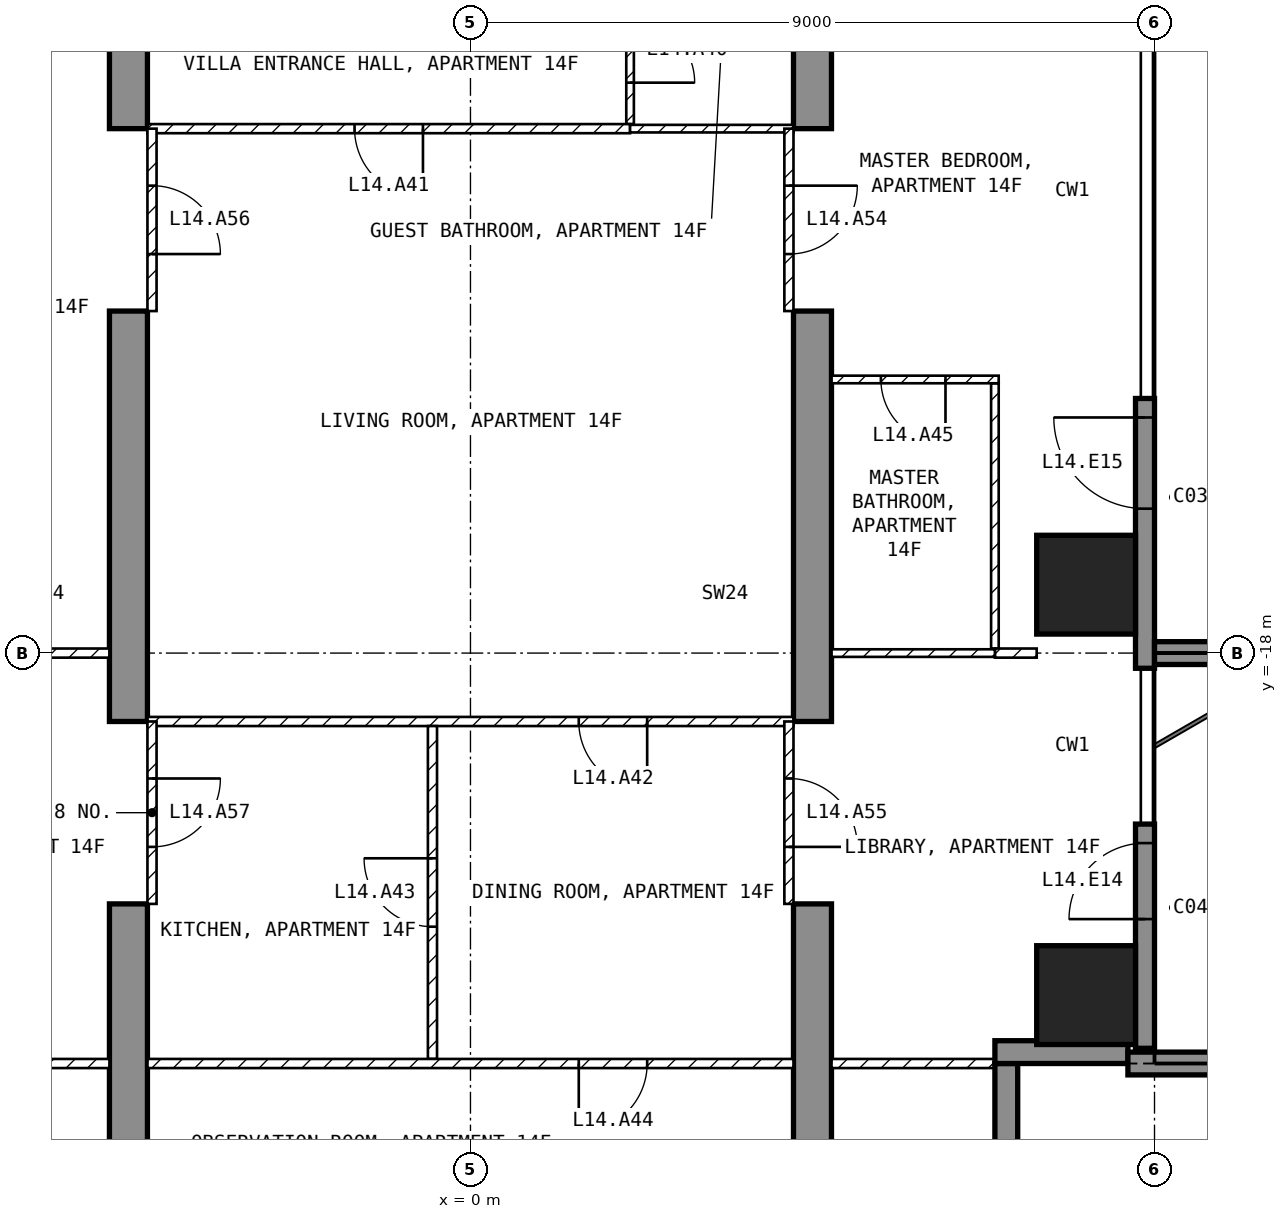
"""IFC4 building model, lengths in metres.
Left out: names, types, materials, properties, quantities, classifications, styles, units other than length and angle.
Written with IfcOpenShell. Run it as: python <this file> out.ifc"""

import sys

from ifc_helpers import new_model, si_unit, direction, frame, frame_2d, origin, origin_2d, place, context, subcontext, project, spatial, polyline, rectangle, outline, extrude, element, fill, save


model = new_model("IFC4")
c1 = context("Model", 3, precision=1e-05, world=origin(), true_north=direction((0.0, 1.0)))
c2 = subcontext(c1, "Body", "Model", "MODEL_VIEW")
j1 = project(units=[si_unit("LENGTHUNIT", "METRE"), si_unit("PLANEANGLEUNIT", "RADIAN")], contexts=[c1])
p1 = place(None, origin())
s1 = spatial("IfcSite", under=j1, at=p1, CompositionType="ELEMENT")
p2 = place(p1, origin())
s2 = spatial("IfcBuilding", under=s1, at=p2, CompositionType="ELEMENT")
p3 = place(p2, frame((0.0, 0.0, 68.0)))
s3 = spatial("IfcBuildingStorey", under=s2, at=p3, CompositionType="ELEMENT", Elevation=68.0)
for number, where, z_axis, x_axis in (
    (1, (8.1, -22.5, -0.25), (0.0, 0.0, 1.0), (1.0, 0.0, 0.0)),
    (2, (8.1, -17.1, -0.25), (0.0, 0.0, 1.0), (1.0, 0.0, 0.0)),
):
    element("IfcColumn", number, at=place(p3, frame(where, z_axis=z_axis, x_axis=x_axis)), inside=s3, PredefinedType="COLUMN", context=c2, shape_type="SweptSolid", body=[
        extrude(rectangle(XDim=1.3, YDim=1.3, at=origin_2d()), origin(), (0.0, 0.0, 1.0), 3.5),
    ])
for number, where, z_axis, x_axis in (
    (3, (-4.75, -25.45, -0.25), (1.0, 0.0, 0.0), (0.0, 1.0, 0.0)),
    (4, (4.25, -25.45, -0.25), (1.0, 0.0, 0.0), (0.0, 1.0, 0.0)),
):
    element("IfcWall", number, at=place(p3, frame(where, z_axis=z_axis, x_axis=x_axis)), inside=s3, PredefinedType="SHEAR", context=c2, shape_type="SweptSolid", body=[
        extrude(outline(polyline([(0.0, 0.0), (4.15, 0.0), (4.15, 2.65), (6.55, 2.65), (6.55, 0.0), (11.95, 0.0), (11.95, 2.65), (14.35, 2.65), (14.35, 0.0), (16.45, 0.0), (16.45, 3.5), (0.0, 3.5), (0.0, 0.0)])), origin(), (0.0, 0.0, 1.0), 0.5),
    ])
p4 = place(p3, frame((8.875, -23.2, 0.0), z_axis=(0.0, 0.0, 1.0), x_axis=(0.0, 1.0, 0.0)))
e5 = element("IfcWall", 5, at=p4, inside=s3, PredefinedType="SOLIDWALL", context=c2, shape_type="SweptSolid", body=[
    extrude(rectangle(XDim=2.95, YDim=0.25, at=frame_2d((1.475, 0.0))), origin(), (0.0, 0.0, 1.0), 3.25),
])
p5 = place(p4, frame((1.7, 0.0, 0.0)))
e6 = element("IfcOpeningElement", 6, at=p5, cuts=e5, PredefinedType="OPENING", context=c2, shape_type="SweptSolid", body=[
    extrude(rectangle(XDim=1.0, YDim=2.4, at=frame_2d((0.5, 1.2))), frame((0.0, 0.135, 0.0), z_axis=(0.0, -1.0, 0.0), x_axis=(1.0, 0.0, 0.0)), (0.0, 0.0, 1.0), 0.27),
])
p6 = place(p3, frame((8.875, -18.2, 0.0), z_axis=(0.0, 0.0, 1.0), x_axis=(0.0, 1.0, 0.0)))
e7 = element("IfcWall", 7, at=p6, inside=s3, PredefinedType="SOLIDWALL", context=c2, shape_type="SweptSolid", body=[
    extrude(rectangle(XDim=3.55, YDim=0.25, at=frame_2d((1.775, 0.0))), origin(), (0.0, 0.0, 1.0), 3.25),
])
p7 = place(p6, frame((2.1, 0.0, 0.0)))
e8 = element("IfcOpeningElement", 8, at=p7, cuts=e7, PredefinedType="OPENING", context=c2, shape_type="SweptSolid", body=[
    extrude(rectangle(XDim=1.2, YDim=2.4, at=frame_2d((0.6, 1.2))), frame((0.0, 0.135, 0.0), z_axis=(0.0, -1.0, 0.0), x_axis=(1.0, 0.0, 0.0)), (0.0, 0.0, 1.0), 0.27),
])
p8 = place(p3, frame((7.05, -25.2, 0.0), z_axis=(0.0, 0.0, 1.0), x_axis=(0.0, 1.0, 0.0)))
e9 = element("IfcWall", 9, at=p8, inside=s3, PredefinedType="SOLIDWALL", context=c2, shape_type="SweptSolid", body=[
    extrude(rectangle(XDim=1.8, YDim=0.3, at=frame_2d((0.9, 0.0))), origin(), (0.0, 0.0, 1.0), 3.25),
])
p9 = place(p3, frame((6.9, -23.25, 0.0), z_axis=(0.0, 0.0, 1.0), x_axis=(1.0, 0.0, 0.0)))
e10 = element("IfcWall", 10, at=p9, inside=s3, PredefinedType="SOLIDWALL", context=c2, shape_type="SweptSolid", body=[
    extrude(rectangle(XDim=1.75, YDim=0.3, at=frame_2d((0.875, 0.0))), origin(), (0.0, 0.0, 1.0), 3.25),
])
p10 = place(p3, frame((8.65, -23.4, 0.0), z_axis=(0.0, 0.0, 1.0), x_axis=(1.0, 0.0, 0.0)))
e11 = element("IfcWall", 11, at=p10, inside=s3, PredefinedType="SOLIDWALL", context=c2, shape_type="SweptSolid", body=[
    extrude(rectangle(XDim=3.05, YDim=0.3, at=frame_2d((1.525, 0.0))), origin(), (0.0, 0.0, 1.0), 3.25),
])
p11 = place(p3, frame((9.0, -18.0, 0.0), z_axis=(0.0, 0.0, 1.0), x_axis=(1.0, 0.0, 0.0)))
e12 = element("IfcWall", 12, at=p11, inside=s3, PredefinedType="SOLIDWALL", context=c2, shape_type="SweptSolid", body=[
    extrude(rectangle(XDim=2.7, YDim=0.3, at=frame_2d((1.35, 0.0))), origin(), (0.0, 0.0, 1.0), 3.25),
])
p12 = place(p3, frame((2.1, -9.1, 0.0), z_axis=(0.0, 0.0, 1.0), x_axis=(0.0, -1.0, 0.0)))
e13 = element("IfcWall", 13, at=p12, inside=s3, PredefinedType="PARTITIONING", context=c2, shape_type="SweptSolid", body=[
    extrude(rectangle(XDim=1.94, YDim=0.1, at=frame_2d((0.97, 0.0))), origin(), (0.0, 0.0, 1.0), 3.25),
])
p13 = place(p12, frame((0.545, 0.0, 0.0)))
e14 = element("IfcOpeningElement", 14, at=p13, cuts=e13, PredefinedType="OPENING", context=c2, shape_type="SweptSolid", body=[
    extrude(rectangle(XDim=0.85, YDim=2.1, at=frame_2d((0.425, 1.05))), frame((0.0, 0.06, 0.0), z_axis=(0.0, -1.0, 0.0), x_axis=(1.0, 0.0, 0.0)), (0.0, 0.0, 1.0), 0.12),
])
p14 = place(p3, frame((2.1, -11.1, 0.0), z_axis=(0.0, 0.0, 1.0), x_axis=(-1.0, 0.0, 0.0)))
e15 = element("IfcWall", 15, at=p14, inside=s3, PredefinedType="PARTITIONING", context=c2, shape_type="SweptSolid", body=[
    extrude(rectangle(XDim=6.35, YDim=0.12, at=frame_2d((3.175, 0.0))), origin(), (0.0, 0.0, 1.0), 3.25),
])
p15 = place(p14, frame((2.725, 0.0, 0.0)))
e16 = element("IfcOpeningElement", 16, at=p15, cuts=e15, PredefinedType="OPENING", context=c2, shape_type="SweptSolid", body=[
    extrude(rectangle(XDim=0.9, YDim=2.1, at=frame_2d((0.45, 1.05))), frame((0.0, 0.07, 0.0), z_axis=(0.0, -1.0, 0.0), x_axis=(1.0, 0.0, 0.0)), (0.0, 0.0, 1.0), 0.14),
])
p16 = place(p3, frame((4.25, -11.1, 0.0), z_axis=(0.0, 0.0, 1.0), x_axis=(-1.0, 0.0, 0.0)))
e17 = element("IfcWall", 17, at=p16, inside=s3, PredefinedType="PARTITIONING", context=c2, shape_type="SweptSolid", body=[
    extrude(rectangle(XDim=2.15, YDim=0.1, at=frame_2d((1.075, 0.0))), origin(), (0.0, 0.0, 1.0), 3.25),
])
p17 = place(p3, frame((4.25, -18.9, 0.0), z_axis=(0.0, 0.0, 1.0), x_axis=(-1.0, 0.0, 0.0)))
e18 = element("IfcWall", 18, at=p17, inside=s3, PredefinedType="PARTITIONING", context=c2, shape_type="SweptSolid", body=[
    extrude(rectangle(XDim=8.5, YDim=0.12, at=frame_2d((4.25, 0.0))), origin(), (0.0, 0.0, 1.0), 3.25),
])
p18 = place(p17, frame((1.925, 0.0, 0.0)))
e19 = element("IfcOpeningElement", 19, at=p18, cuts=e18, PredefinedType="OPENING", context=c2, shape_type="SweptSolid", body=[
    extrude(rectangle(XDim=0.9, YDim=2.1, at=frame_2d((0.45, 1.05))), frame((0.0, 0.07, 0.0), z_axis=(0.0, -1.0, 0.0), x_axis=(1.0, 0.0, 0.0)), (0.0, 0.0, 1.0), 0.14),
])
p19 = place(p3, frame((-0.5, -23.34, 0.0), z_axis=(0.0, 0.0, 1.0), x_axis=(0.0, 1.0, 0.0)))
e20 = element("IfcWall", 20, at=p19, inside=s3, PredefinedType="PARTITIONING", context=c2, shape_type="SweptSolid", body=[
    extrude(rectangle(XDim=4.38, YDim=0.12, at=frame_2d((2.19, 0.0))), origin(), (0.0, 0.0, 1.0), 3.25),
])
p20 = place(p19, frame((1.74, 0.0, 0.0)))
e21 = element("IfcOpeningElement", 21, at=p20, cuts=e20, PredefinedType="OPENING", context=c2, shape_type="SweptSolid", body=[
    extrude(rectangle(XDim=0.9, YDim=2.1, at=frame_2d((0.45, 1.05))), frame((0.0, 0.07, 0.0), z_axis=(0.0, -1.0, 0.0), x_axis=(1.0, 0.0, 0.0)), (0.0, 0.0, 1.0), 0.14),
])
p21 = place(p3, frame((4.25, -23.4, 0.0), z_axis=(0.0, 0.0, 1.0), x_axis=(-1.0, 0.0, 0.0)))
e22 = element("IfcWall", 22, at=p21, inside=s3, PredefinedType="PARTITIONING", context=c2, shape_type="SweptSolid", body=[
    extrude(rectangle(XDim=8.5, YDim=0.12, at=frame_2d((4.25, 0.0))), origin(), (0.0, 0.0, 1.0), 3.25),
])
p22 = place(p21, frame((1.925, 0.0, 0.0)))
e23 = element("IfcOpeningElement", 23, at=p22, cuts=e22, PredefinedType="OPENING", context=c2, shape_type="SweptSolid", body=[
    extrude(rectangle(XDim=0.9, YDim=2.1, at=frame_2d((0.45, 1.05))), frame((0.0, 0.07, 0.0), z_axis=(0.0, -1.0, 0.0), x_axis=(1.0, 0.0, 0.0)), (0.0, 0.0, 1.0), 0.14),
])
p23 = place(p3, frame((6.9, -17.94, 0.0), z_axis=(0.0, 0.0, 1.0), x_axis=(0.0, 1.0, 0.0)))
e24 = element("IfcWall", 24, at=p23, inside=s3, PredefinedType="PARTITIONING", context=c2, shape_type="SweptSolid", body=[
    extrude(rectangle(XDim=3.49, YDim=0.1, at=frame_2d((1.745, 0.0))), origin(), (0.0, 0.0, 1.0), 3.25),
])
p24 = place(p3, frame((6.95, -14.4, 0.0), z_axis=(0.0, 0.0, 1.0), x_axis=(-1.0, 0.0, 0.0)))
e25 = element("IfcWall", 25, at=p24, inside=s3, PredefinedType="PARTITIONING", context=c2, shape_type="SweptSolid", body=[
    extrude(rectangle(XDim=2.2, YDim=0.1, at=frame_2d((1.1, 0.0))), origin(), (0.0, 0.0, 1.0), 3.25),
])
p25 = place(p24, frame((0.7, 0.0, 0.0)))
e26 = element("IfcOpeningElement", 26, at=p25, cuts=e25, PredefinedType="OPENING", context=c2, shape_type="SweptSolid", body=[
    extrude(rectangle(XDim=0.85, YDim=2.1, at=frame_2d((0.425, 1.05))), frame((0.0, 0.06, 0.0), z_axis=(0.0, -1.0, 0.0), x_axis=(1.0, 0.0, 0.0)), (0.0, 0.0, 1.0), 0.12),
])
p26 = place(p3, frame((7.45, -18.0, 0.0), z_axis=(0.0, 0.0, 1.0), x_axis=(-1.0, 0.0, 0.0)))
e27 = element("IfcWall", 27, at=p26, inside=s3, PredefinedType="PARTITIONING", context=c2, shape_type="SweptSolid", body=[
    extrude(rectangle(XDim=0.55, YDim=0.12, at=frame_2d((0.275, 0.0))), origin(), (0.0, 0.0, 1.0), 3.25),
])
p27 = place(p3, frame((6.9, -18.0, 0.0), z_axis=(0.0, 0.0, 1.0), x_axis=(-1.0, 0.0, 0.0)))
e28 = element("IfcWall", 28, at=p27, inside=s3, PredefinedType="PARTITIONING", context=c2, shape_type="SweptSolid", body=[
    extrude(rectangle(XDim=2.15, YDim=0.1, at=frame_2d((1.075, 0.0))), origin(), (0.0, 0.0, 1.0), 3.25),
])
p28 = place(p3, frame((7.12, -23.4, 0.0), z_axis=(0.0, 0.0, 1.0), x_axis=(-1.0, 0.0, 0.0)))
e29 = element("IfcWall", 29, at=p28, inside=s3, PredefinedType="PARTITIONING", context=c2, shape_type="SweptSolid", body=[
    extrude(rectangle(XDim=2.37, YDim=0.12, at=frame_2d((1.185, 0.0))), origin(), (0.0, 0.0, 1.0), 3.25),
])
p29 = place(p3, frame((-4.75, -18.0, 0.0), z_axis=(0.0, 0.0, 1.0), x_axis=(-1.0, 0.0, 0.0)))
e30 = element("IfcWall", 30, at=p29, inside=s3, PredefinedType="PARTITIONING", context=c2, shape_type="SweptSolid", body=[
    extrude(rectangle(XDim=2.7, YDim=0.12, at=frame_2d((1.35, 0.0))), origin(), (0.0, 0.0, 1.0), 3.25),
])
p30 = place(p3, frame((-4.75, -23.4, 0.0), z_axis=(0.0, 0.0, 1.0), x_axis=(-1.0, 0.0, 0.0)))
e31 = element("IfcWall", 31, at=p30, inside=s3, PredefinedType="PARTITIONING", context=c2, shape_type="SweptSolid", body=[
    extrude(rectangle(XDim=2.37, YDim=0.12, at=frame_2d((1.185, 0.0))), origin(), (0.0, 0.0, 1.0), 3.25),
])
p31 = place(p3, frame((4.19, -11.1, 0.0), z_axis=(0.0, 0.0, 1.0), x_axis=(0.0, -1.0, 0.0)))
e32 = element("IfcWall", 32, at=p31, inside=s3, PredefinedType="PARTITIONING", context=c2, shape_type="SweptSolid", body=[
    extrude(rectangle(XDim=2.4, YDim=0.12, at=frame_2d((1.2, 0.0))), origin(), (0.0, 0.0, 1.0), 2.4),
])
p32 = place(p31, frame((0.75, 0.0, 0.0)))
e33 = element("IfcOpeningElement", 33, at=p32, cuts=e32, PredefinedType="OPENING", context=c2, shape_type="SweptSolid", body=[
    extrude(rectangle(XDim=0.9, YDim=2.1, at=frame_2d((0.45, 1.05))), frame((0.0, 0.07, 0.0), z_axis=(0.0, -1.0, 0.0), x_axis=(1.0, 0.0, 0.0)), (0.0, 0.0, 1.0), 0.14),
])
p33 = place(p3, frame((4.19, -18.9, 0.0), z_axis=(0.0, 0.0, 1.0), x_axis=(0.0, -1.0, 0.0)))
e34 = element("IfcWall", 34, at=p33, inside=s3, PredefinedType="PARTITIONING", context=c2, shape_type="SweptSolid", body=[
    extrude(rectangle(XDim=2.4, YDim=0.12, at=frame_2d((1.2, 0.0))), origin(), (0.0, 0.0, 1.0), 2.4),
])
p34 = place(p33, frame((0.75, 0.0, 0.0)))
e35 = element("IfcOpeningElement", 35, at=p34, cuts=e34, PredefinedType="OPENING", context=c2, shape_type="SweptSolid", body=[
    extrude(rectangle(XDim=0.9, YDim=2.1, at=frame_2d((0.45, 1.05))), frame((0.0, 0.07, 0.0), z_axis=(0.0, -1.0, 0.0), x_axis=(1.0, 0.0, 0.0)), (0.0, 0.0, 1.0), 0.14),
])
p35 = place(p3, frame((-4.19, -11.1, 0.0), z_axis=(0.0, 0.0, 1.0), x_axis=(0.0, -1.0, 0.0)))
e36 = element("IfcWall", 36, at=p35, inside=s3, PredefinedType="PARTITIONING", context=c2, shape_type="SweptSolid", body=[
    extrude(rectangle(XDim=2.4, YDim=0.12, at=frame_2d((1.2, 0.0))), origin(), (0.0, 0.0, 1.0), 2.4),
])
p36 = place(p35, frame((0.75, 0.0, 0.0)))
e37 = element("IfcOpeningElement", 37, at=p36, cuts=e36, PredefinedType="OPENING", context=c2, shape_type="SweptSolid", body=[
    extrude(rectangle(XDim=0.9, YDim=2.1, at=frame_2d((0.45, 1.05))), frame((0.0, 0.07, 0.0), z_axis=(0.0, -1.0, 0.0), x_axis=(1.0, 0.0, 0.0)), (0.0, 0.0, 1.0), 0.14),
])
p37 = place(p3, frame((-4.19, -18.9, 0.0), z_axis=(0.0, 0.0, 1.0), x_axis=(0.0, -1.0, 0.0)))
e38 = element("IfcWall", 38, at=p37, inside=s3, PredefinedType="PARTITIONING", context=c2, shape_type="SweptSolid", body=[
    extrude(rectangle(XDim=2.4, YDim=0.12, at=frame_2d((1.2, 0.0))), origin(), (0.0, 0.0, 1.0), 2.4),
])
p38 = place(p37, frame((0.75, 0.0, 0.0)))
e39 = element("IfcOpeningElement", 39, at=p38, cuts=e38, PredefinedType="OPENING", context=c2, shape_type="SweptSolid", body=[
    extrude(rectangle(XDim=0.9, YDim=2.1, at=frame_2d((0.45, 1.05))), frame((0.0, 0.07, 0.0), z_axis=(0.0, -1.0, 0.0), x_axis=(1.0, 0.0, 0.0)), (0.0, 0.0, 1.0), 0.14),
])
p39 = place(p5, origin())
e40 = element("IfcDoor", 40, at=p39, inside=s3, OperationType="SINGLE_SWING_LEFT", PredefinedType="DOOR", context=c2, shape_type="SweptSolid", body=[
    extrude(rectangle(XDim=1.0, YDim=2.4, at=frame_2d((0.5, 1.2))), frame((0.0, 0.025, 0.0), z_axis=(0.0, -1.0, 0.0), x_axis=(1.0, 0.0, 0.0)), (0.0, 0.0, 1.0), 0.05),
])
fill(e6, e40)
p40 = place(p7, origin())
e41 = element("IfcDoor", 41, at=p40, inside=s3, OperationType="SINGLE_SWING_RIGHT", PredefinedType="DOOR", context=c2, shape_type="SweptSolid", body=[
    extrude(rectangle(XDim=1.2, YDim=2.4, at=frame_2d((0.6, 1.2))), frame((0.0, 0.025, 0.0), z_axis=(0.0, -1.0, 0.0), x_axis=(1.0, 0.0, 0.0)), (0.0, 0.0, 1.0), 0.05),
])
fill(e8, e41)
p41 = place(p13, origin())
e42 = element("IfcDoor", 42, at=p41, inside=s3, OperationType="SINGLE_SWING_RIGHT", PredefinedType="DOOR", context=c2, shape_type="SweptSolid", body=[
    extrude(rectangle(XDim=0.85, YDim=2.1, at=frame_2d((0.425, 1.05))), frame((0.0, 0.025, 0.0), z_axis=(0.0, -1.0, 0.0), x_axis=(1.0, 0.0, 0.0)), (0.0, 0.0, 1.0), 0.05),
])
fill(e14, e42)
p42 = place(p15, origin())
e43 = element("IfcDoor", 43, at=p42, inside=s3, OperationType="SINGLE_SWING_LEFT", PredefinedType="DOOR", context=c2, shape_type="SweptSolid", body=[
    extrude(rectangle(XDim=0.9, YDim=2.1, at=frame_2d((0.45, 1.05))), frame((0.0, 0.025, 0.0), z_axis=(0.0, -1.0, 0.0), x_axis=(1.0, 0.0, 0.0)), (0.0, 0.0, 1.0), 0.05),
])
fill(e16, e43)
p43 = place(p18, origin())
e44 = element("IfcDoor", 44, at=p43, inside=s3, OperationType="SINGLE_SWING_LEFT", PredefinedType="DOOR", context=c2, shape_type="SweptSolid", body=[
    extrude(rectangle(XDim=0.9, YDim=2.1, at=frame_2d((0.45, 1.05))), frame((0.0, 0.025, 0.0), z_axis=(0.0, -1.0, 0.0), x_axis=(1.0, 0.0, 0.0)), (0.0, 0.0, 1.0), 0.05),
])
fill(e19, e44)
p44 = place(p20, origin())
e45 = element("IfcDoor", 45, at=p44, inside=s3, OperationType="SINGLE_SWING_RIGHT", PredefinedType="DOOR", context=c2, shape_type="SweptSolid", body=[
    extrude(rectangle(XDim=0.9, YDim=2.1, at=frame_2d((0.45, 1.05))), frame((0.0, 0.025, 0.0), z_axis=(0.0, -1.0, 0.0), x_axis=(1.0, 0.0, 0.0)), (0.0, 0.0, 1.0), 0.05),
])
fill(e21, e45)
p45 = place(p22, origin())
e46 = element("IfcDoor", 46, at=p45, inside=s3, OperationType="SINGLE_SWING_RIGHT", PredefinedType="DOOR", context=c2, shape_type="SweptSolid", body=[
    extrude(rectangle(XDim=0.9, YDim=2.1, at=frame_2d((0.45, 1.05))), frame((0.0, 0.025, 0.0), z_axis=(0.0, -1.0, 0.0), x_axis=(1.0, 0.0, 0.0)), (0.0, 0.0, 1.0), 0.05),
])
fill(e23, e46)
p46 = place(p25, origin())
e47 = element("IfcDoor", 47, at=p46, inside=s3, OperationType="SINGLE_SWING_LEFT", PredefinedType="DOOR", context=c2, shape_type="SweptSolid", body=[
    extrude(rectangle(XDim=0.85, YDim=2.1, at=frame_2d((0.425, 1.05))), frame((0.0, 0.025, 0.0), z_axis=(0.0, -1.0, 0.0), x_axis=(1.0, 0.0, 0.0)), (0.0, 0.0, 1.0), 0.05),
])
fill(e26, e47)
p47 = place(p32, origin())
e48 = element("IfcDoor", 48, at=p47, inside=s3, OperationType="SINGLE_SWING_LEFT", PredefinedType="DOOR", context=c2, shape_type="SweptSolid", body=[
    extrude(rectangle(XDim=0.9, YDim=2.1, at=frame_2d((0.45, 1.05))), frame((0.0, 0.025, 0.0), z_axis=(0.0, -1.0, 0.0), x_axis=(1.0, 0.0, 0.0)), (0.0, 0.0, 1.0), 0.05),
])
fill(e33, e48)
p48 = place(p34, origin())
e49 = element("IfcDoor", 49, at=p48, inside=s3, OperationType="SINGLE_SWING_RIGHT", PredefinedType="DOOR", context=c2, shape_type="SweptSolid", body=[
    extrude(rectangle(XDim=0.9, YDim=2.1, at=frame_2d((0.45, 1.05))), frame((0.0, 0.025, 0.0), z_axis=(0.0, -1.0, 0.0), x_axis=(1.0, 0.0, 0.0)), (0.0, 0.0, 1.0), 0.05),
])
fill(e35, e49)
p49 = place(p36, origin())
e50 = element("IfcDoor", 50, at=p49, inside=s3, OperationType="SINGLE_SWING_RIGHT", PredefinedType="DOOR", context=c2, shape_type="SweptSolid", body=[
    extrude(rectangle(XDim=0.9, YDim=2.1, at=frame_2d((0.45, 1.05))), frame((0.0, 0.025, 0.0), z_axis=(0.0, -1.0, 0.0), x_axis=(1.0, 0.0, 0.0)), (0.0, 0.0, 1.0), 0.05),
])
fill(e37, e50)
p50 = place(p38, origin())
e51 = element("IfcDoor", 51, at=p50, inside=s3, OperationType="SINGLE_SWING_LEFT", PredefinedType="DOOR", context=c2, shape_type="SweptSolid", body=[
    extrude(rectangle(XDim=0.9, YDim=2.1, at=frame_2d((0.45, 1.05))), frame((0.0, 0.025, 0.0), z_axis=(0.0, -1.0, 0.0), x_axis=(1.0, 0.0, 0.0)), (0.0, 0.0, 1.0), 0.05),
])
fill(e39, e51)
save(model, sys.argv[1])
